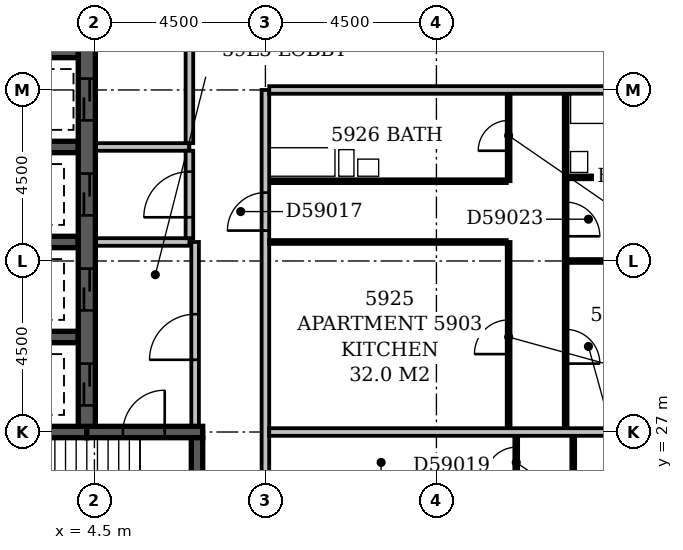
"""IFC4 building model, lengths in metres.
Left out: names, types, materials, properties, quantities, classifications, styles, units other than length and angle.
Written with IfcOpenShell. Run it as: python <this file> out.ifc"""

import sys

from ifc_helpers import new_model, si_unit, direction, frame, frame_2d, origin, place, context, subcontext, project, spatial, rectangle, extrude, element, fill, save


model = new_model("IFC4")
c1 = context("Model", 3, precision=1e-05, world=origin(), true_north=direction((0.0, 1.0)))
c2 = subcontext(c1, "Body", "Model", "MODEL_VIEW")
j1 = project(units=[si_unit("LENGTHUNIT", "METRE"), si_unit("PLANEANGLEUNIT", "RADIAN")], contexts=[c1])
p1 = place(None, origin())
s1 = spatial("IfcSite", under=j1, at=p1, CompositionType="ELEMENT")
p2 = place(p1, origin())
s2 = spatial("IfcBuilding", under=s1, at=p2, CompositionType="ELEMENT")
p3 = place(p2, frame((0.0, 0.0, 229.4)))
s3 = spatial("IfcBuildingStorey", under=s2, at=p3, CompositionType="ELEMENT", Elevation=229.4)
p4 = place(p3, frame((0.35, 27.0, -0.3), z_axis=(0.0, 0.0, 1.0), x_axis=(1.0, 0.0, 0.0)))
e1 = element("IfcWall", 1, at=p4, inside=s3, PredefinedType="SHEAR", context=c2, shape_type="SweptSolid", body=[
    extrude(rectangle(XDim=3.95, YDim=0.3, at=frame_2d((1.975, 0.0))), origin(), (0.0, 0.0, 1.0), 3.55),
])
for number, where, z_axis, x_axis in (
    (2, (0.725, 29.5, -0.3), (0.0, 0.0, 1.0), (1.0, 0.0, 0.0)),
    (3, (0.725, 32.0, -0.3), (0.0, 0.0, 1.0), (1.0, 0.0, 0.0)),
    (4, (0.725, 34.5, -0.3), (0.0, 0.0, 1.0), (1.0, 0.0, 0.0)),
    (5, (0.725, 37.0, -0.3), (0.0, 0.0, 1.0), (1.0, 0.0, 0.0)),
):
    element("IfcWall", number, at=place(p3, frame(where, z_axis=z_axis, x_axis=x_axis)), inside=s3, PredefinedType="SHEAR", context=c2, shape_type="SweptSolid", body=[
        extrude(rectangle(XDim=3.35, YDim=0.3, at=frame_2d((1.675, 0.0))), origin(), (0.0, 0.0, 1.0), 3.55),
    ])
p5 = place(p3, frame((4.3, 27.0, -0.3), z_axis=(0.0, 0.0, 1.0), x_axis=(1.0, 0.0, 0.0)))
e6 = element("IfcWall", 6, at=p5, inside=s3, PredefinedType="SHEAR", context=c2, shape_type="SweptSolid", body=[
    extrude(rectangle(XDim=3.05, YDim=0.3, at=frame_2d((1.525, 0.0))), origin(), (0.0, 0.0, 1.0), 3.55),
])
p6 = place(p5, frame((0.95, 0.0, 0.3)))
e7 = element("IfcOpeningElement", 7, at=p6, cuts=e6, PredefinedType="OPENING", context=c2, shape_type="SweptSolid", body=[
    extrude(rectangle(XDim=1.1, YDim=2.1, at=frame_2d((0.55, 1.05))), frame((0.0, 0.162, 0.0), z_axis=(0.0, -1.0, 0.0), x_axis=(1.0, 0.0, 0.0)), (0.0, 0.0, 1.0), 0.324),
])
p7 = place(p3, frame((4.3, 27.15, -0.3), z_axis=(0.0, 0.0, 1.0), x_axis=(0.0, 1.0, 0.0)))
e8 = element("IfcWall", 8, at=p7, inside=s3, PredefinedType="SHEAR", context=c2, shape_type="SweptSolid", body=[
    extrude(rectangle(XDim=22.125, YDim=0.45, at=frame_2d((11.062, 0.0))), origin(), (0.0, 0.0, 1.0), 3.55),
])
p8 = place(p7, frame((3.05, 0.0, 0.3)))
e9 = element("IfcOpeningElement", 9, at=p8, cuts=e8, PredefinedType="OPENING", context=c2, shape_type="SweptSolid", body=[
    extrude(rectangle(XDim=1.1, YDim=2.1, at=frame_2d((0.55, 1.05))), frame((0.0, 0.237, 0.0), z_axis=(0.0, -1.0, 0.0), x_axis=(1.0, 0.0, 0.0)), (0.0, 0.0, 1.0), 0.474),
])
p9 = place(p7, frame((0.55, 0.0, 0.3)))
e10 = element("IfcOpeningElement", 10, at=p9, cuts=e8, PredefinedType="OPENING", context=c2, shape_type="SweptSolid", body=[
    extrude(rectangle(XDim=1.1, YDim=2.1, at=frame_2d((0.55, 1.05))), frame((0.0, 0.237, 0.0), z_axis=(0.0, -1.0, 0.0), x_axis=(1.0, 0.0, 0.0)), (0.0, 0.0, 1.0), 0.474),
])
p10 = place(p7, frame((20.55, 0.0, 0.3)))
e11 = element("IfcOpeningElement", 11, at=p10, cuts=e8, PredefinedType="OPENING", context=c2, shape_type="SweptSolid", body=[
    extrude(rectangle(XDim=1.1, YDim=2.1, at=frame_2d((0.55, 1.05))), frame((0.0, 0.237, 0.0), z_axis=(0.0, -1.0, 0.0), x_axis=(1.0, 0.0, 0.0)), (0.0, 0.0, 1.0), 0.474),
])
p11 = place(p7, frame((18.05, 0.0, 0.3)))
e12 = element("IfcOpeningElement", 12, at=p11, cuts=e8, PredefinedType="OPENING", context=c2, shape_type="SweptSolid", body=[
    extrude(rectangle(XDim=1.1, YDim=2.1, at=frame_2d((0.55, 1.05))), frame((0.0, 0.237, 0.0), z_axis=(0.0, -1.0, 0.0), x_axis=(1.0, 0.0, 0.0)), (0.0, 0.0, 1.0), 0.474),
])
p12 = place(p7, frame((15.55, 0.0, 0.3)))
e13 = element("IfcOpeningElement", 13, at=p12, cuts=e8, PredefinedType="OPENING", context=c2, shape_type="SweptSolid", body=[
    extrude(rectangle(XDim=1.1, YDim=2.1, at=frame_2d((0.55, 1.05))), frame((0.0, 0.237, 0.0), z_axis=(0.0, -1.0, 0.0), x_axis=(1.0, 0.0, 0.0)), (0.0, 0.0, 1.0), 0.474),
])
p13 = place(p7, frame((13.05, 0.0, 0.3)))
e14 = element("IfcOpeningElement", 14, at=p13, cuts=e8, PredefinedType="OPENING", context=c2, shape_type="SweptSolid", body=[
    extrude(rectangle(XDim=1.1, YDim=2.1, at=frame_2d((0.55, 1.05))), frame((0.0, 0.237, 0.0), z_axis=(0.0, -1.0, 0.0), x_axis=(1.0, 0.0, 0.0)), (0.0, 0.0, 1.0), 0.474),
])
p14 = place(p7, frame((10.55, 0.0, 0.3)))
e15 = element("IfcOpeningElement", 15, at=p14, cuts=e8, PredefinedType="OPENING", context=c2, shape_type="SweptSolid", body=[
    extrude(rectangle(XDim=1.1, YDim=2.1, at=frame_2d((0.55, 1.05))), frame((0.0, 0.237, 0.0), z_axis=(0.0, -1.0, 0.0), x_axis=(1.0, 0.0, 0.0)), (0.0, 0.0, 1.0), 0.474),
])
p15 = place(p7, frame((8.05, 0.0, 0.3)))
e16 = element("IfcOpeningElement", 16, at=p15, cuts=e8, PredefinedType="OPENING", context=c2, shape_type="SweptSolid", body=[
    extrude(rectangle(XDim=1.1, YDim=2.1, at=frame_2d((0.55, 1.05))), frame((0.0, 0.237, 0.0), z_axis=(0.0, -1.0, 0.0), x_axis=(1.0, 0.0, 0.0)), (0.0, 0.0, 1.0), 0.474),
])
p16 = place(p7, frame((5.55, 0.0, 0.3)))
e17 = element("IfcOpeningElement", 17, at=p16, cuts=e8, PredefinedType="OPENING", context=c2, shape_type="SweptSolid", body=[
    extrude(rectangle(XDim=1.1, YDim=2.1, at=frame_2d((0.55, 1.05))), frame((0.0, 0.237, 0.0), z_axis=(0.0, -1.0, 0.0), x_axis=(1.0, 0.0, 0.0)), (0.0, 0.0, 1.0), 0.474),
])
p17 = place(p3, frame((7.2, 22.65, -0.3), z_axis=(0.0, 0.0, 1.0), x_axis=(0.0, 1.0, 0.0)))
e18 = element("IfcWall", 18, at=p17, inside=s3, PredefinedType="SHEAR", context=c2, shape_type="SweptSolid", body=[
    extrude(rectangle(XDim=4.2, YDim=0.3, at=frame_2d((2.1, 0.0))), origin(), (0.0, 0.0, 1.0), 3.55),
])
p18 = place(p17, frame((0.8, 0.0, 0.3)))
e19 = element("IfcOpeningElement", 19, at=p18, cuts=e18, PredefinedType="OPENING", context=c2, shape_type="SweptSolid", body=[
    extrude(rectangle(XDim=1.1, YDim=2.1, at=frame_2d((0.55, 1.05))), frame((0.0, 0.162, 0.0), z_axis=(0.0, -1.0, 0.0), x_axis=(1.0, 0.0, 0.0)), (0.0, 0.0, 1.0), 0.324),
])
p19 = place(p3, frame((4.545, 34.5, 0.0), z_axis=(0.0, 0.0, 1.0), x_axis=(1.0, 0.0, 0.0)))
e20 = element("IfcWall", 20, at=p19, inside=s3, PredefinedType="PARTITIONING", context=c2, shape_type="SweptSolid", body=[
    extrude(rectangle(XDim=2.455, YDim=0.2, at=frame_2d((1.228, 0.0))), origin(), (0.0, 0.0, 1.0), 3.25),
])
p20 = place(p3, frame((7.0, 34.6, 0.0), z_axis=(0.0, 0.0, 1.0), x_axis=(0.0, 1.0, 0.0)))
e21 = element("IfcWall", 21, at=p20, inside=s3, PredefinedType="PARTITIONING", context=c2, shape_type="SweptSolid", body=[
    extrude(rectangle(XDim=14.9, YDim=0.2, at=frame_2d((7.45, 0.0))), origin(), (0.0, 0.0, 1.0), 3.25),
])
p21 = place(p20, frame((2.8, 0.0, 0.0)))
e22 = element("IfcOpeningElement", 22, at=p21, cuts=e21, PredefinedType="OPENING", context=c2, shape_type="SweptSolid", body=[
    extrude(rectangle(XDim=1.2, YDim=2.1, at=frame_2d((0.6, 1.05))), frame((0.0, 0.112, 0.0), z_axis=(0.0, -1.0, 0.0), x_axis=(1.0, 0.0, 0.0)), (0.0, 0.0, 1.0), 0.224),
])
p22 = place(p20, frame((9.8, 0.0, 0.0)))
e23 = element("IfcOpeningElement", 23, at=p22, cuts=e21, PredefinedType="OPENING", context=c2, shape_type="SweptSolid", body=[
    extrude(rectangle(XDim=1.2, YDim=2.1, at=frame_2d((0.6, 1.05))), frame((0.0, 0.112, 0.0), z_axis=(0.0, -1.0, 0.0), x_axis=(1.0, 0.0, 0.0)), (0.0, 0.0, 1.0), 0.224),
])
p23 = place(p3, frame((4.545, 32.0, 0.0), z_axis=(0.0, 0.0, 1.0), x_axis=(1.0, 0.0, 0.0)))
e24 = element("IfcWall", 24, at=p23, inside=s3, PredefinedType="PARTITIONING", context=c2, shape_type="SweptSolid", body=[
    extrude(rectangle(XDim=2.455, YDim=0.2, at=frame_2d((1.228, 0.0))), origin(), (0.0, 0.0, 1.0), 3.25),
])
p24 = place(p3, frame((7.0, 32.1, 0.0), z_axis=(0.0, 0.0, 1.0), x_axis=(0.0, 1.0, 0.0)))
e25 = element("IfcWall", 25, at=p24, inside=s3, PredefinedType="PARTITIONING", context=c2, shape_type="SweptSolid", body=[
    extrude(rectangle(XDim=2.3, YDim=0.2, at=frame_2d((1.15, 0.0))), origin(), (0.0, 0.0, 1.0), 3.25),
])
p25 = place(p24, frame((0.55, 0.0, 0.0)))
e26 = element("IfcOpeningElement", 26, at=p25, cuts=e25, PredefinedType="OPENING", context=c2, shape_type="SweptSolid", body=[
    extrude(rectangle(XDim=1.2, YDim=2.1, at=frame_2d((0.6, 1.05))), frame((0.0, 0.112, 0.0), z_axis=(0.0, -1.0, 0.0), x_axis=(1.0, 0.0, 0.0)), (0.0, 0.0, 1.0), 0.224),
])
p26 = place(p3, frame((7.15, 27.17, 0.0), z_axis=(0.0, 0.0, 1.0), x_axis=(0.0, 1.0, 0.0)))
e27 = element("IfcWall", 27, at=p26, inside=s3, PredefinedType="PARTITIONING", context=c2, shape_type="SweptSolid", body=[
    extrude(rectangle(XDim=4.83, YDim=0.2, at=frame_2d((2.415, 0.0))), origin(), (0.0, 0.0, 1.0), 3.25),
])
p27 = place(p26, frame((1.73, 0.0, 0.0)))
e28 = element("IfcOpeningElement", 28, at=p27, cuts=e27, PredefinedType="OPENING", context=c2, shape_type="SweptSolid", body=[
    extrude(rectangle(XDim=1.2, YDim=2.1, at=frame_2d((0.6, 1.05))), frame((0.0, 0.112, 0.0), z_axis=(0.0, -1.0, 0.0), x_axis=(1.0, 0.0, 0.0)), (0.0, 0.0, 1.0), 0.224),
])
p28 = place(p3, frame((17.1, 17.4, 0.0), z_axis=(0.0, 0.0, 1.0), x_axis=(0.0, 1.0, 0.0)))
e29 = element("IfcWall", 29, at=p28, inside=s3, PredefinedType="PARTITIONING", context=c2, shape_type="SweptSolid", body=[
    extrude(rectangle(XDim=9.5, YDim=0.1, at=frame_2d((4.75, 0.0))), origin(), (0.0, 0.0, 1.0), 3.25),
])
p29 = place(p28, frame((2.4, 0.0, 0.0)))
e30 = element("IfcOpeningElement", 30, at=p29, cuts=e29, PredefinedType="OPENING", context=c2, shape_type="SweptSolid", body=[
    extrude(rectangle(XDim=0.9, YDim=2.1, at=frame_2d((0.45, 1.05))), frame((0.0, 0.062, 0.0), z_axis=(0.0, -1.0, 0.0), x_axis=(1.0, 0.0, 0.0)), (0.0, 0.0, 1.0), 0.124),
])
p30 = place(p28, frame((6.9, 0.0, 0.0)))
e31 = element("IfcOpeningElement", 31, at=p30, cuts=e29, PredefinedType="OPENING", context=c2, shape_type="SweptSolid", body=[
    extrude(rectangle(XDim=0.9, YDim=2.1, at=frame_2d((0.45, 1.05))), frame((0.0, 0.062, 0.0), z_axis=(0.0, -1.0, 0.0), x_axis=(1.0, 0.0, 0.0)), (0.0, 0.0, 1.0), 0.124),
])
p31 = place(p3, frame((9.0, 18.45, 0.0), z_axis=(0.0, 0.0, 1.0), x_axis=(0.0, 1.0, 0.0)))
e32 = element("IfcWall", 32, at=p31, inside=s3, PredefinedType="PARTITIONING", context=c2, shape_type="SweptSolid", body=[
    extrude(rectangle(XDim=17.55, YDim=0.2, at=frame_2d((8.775, 0.0))), origin(), (0.0, 0.0, 1.0), 3.25),
])
p32 = place(p31, frame((13.85, 0.0, 0.0)))
e33 = element("IfcOpeningElement", 33, at=p32, cuts=e32, PredefinedType="OPENING", context=c2, shape_type="SweptSolid", body=[
    extrude(rectangle(XDim=1.0, YDim=2.1, at=frame_2d((0.5, 1.05))), frame((0.0, 0.112, 0.0), z_axis=(0.0, -1.0, 0.0), x_axis=(1.0, 0.0, 0.0)), (0.0, 0.0, 1.0), 0.224),
])
p33 = place(p31, frame((3.25, 0.0, 0.0)))
e34 = element("IfcOpeningElement", 34, at=p33, cuts=e32, PredefinedType="OPENING", context=c2, shape_type="SweptSolid", body=[
    extrude(rectangle(XDim=1.0, YDim=2.1, at=frame_2d((0.5, 1.05))), frame((0.0, 0.112, 0.0), z_axis=(0.0, -1.0, 0.0), x_axis=(1.0, 0.0, 0.0)), (0.0, 0.0, 1.0), 0.224),
])
p34 = place(p3, frame((15.6, 23.0, 0.0), z_axis=(0.0, 0.0, 1.0), x_axis=(0.0, 1.0, 0.0)))
e35 = element("IfcWall", 35, at=p34, inside=s3, PredefinedType="PARTITIONING", context=c2, shape_type="SweptSolid", body=[
    extrude(rectangle(XDim=3.9, YDim=0.1, at=frame_2d((1.95, 0.0))), origin(), (0.0, 0.0, 1.0), 3.25),
])
p35 = place(p34, frame((0.8, 0.0, 0.0)))
e36 = element("IfcOpeningElement", 36, at=p35, cuts=e35, PredefinedType="OPENING", context=c2, shape_type="SweptSolid", body=[
    extrude(rectangle(XDim=0.8, YDim=2.1, at=frame_2d((0.4, 1.05))), frame((0.0, 0.062, 0.0), z_axis=(0.0, -1.0, 0.0), x_axis=(1.0, 0.0, 0.0)), (0.0, 0.0, 1.0), 0.124),
])
p36 = place(p34, frame((2.8, 0.0, 0.0)))
e37 = element("IfcOpeningElement", 37, at=p36, cuts=e35, PredefinedType="OPENING", context=c2, shape_type="SweptSolid", body=[
    extrude(rectangle(XDim=0.8, YDim=2.1, at=frame_2d((0.4, 1.05))), frame((0.0, 0.062, 0.0), z_axis=(0.0, -1.0, 0.0), x_axis=(1.0, 0.0, 0.0)), (0.0, 0.0, 1.0), 0.124),
])
p37 = place(p3, frame((9.1, 27.0, 0.0), z_axis=(0.0, 0.0, 1.0), x_axis=(1.0, 0.0, 0.0)))
e38 = element("IfcWall", 38, at=p37, inside=s3, PredefinedType="PARTITIONING", context=c2, shape_type="SweptSolid", body=[
    extrude(rectangle(XDim=12.95, YDim=0.2, at=frame_2d((6.475, 0.0))), origin(), (0.0, 0.0, 1.0), 2.65),
])
p38 = place(p3, frame((15.4, 27.1, 0.0), z_axis=(0.0, 0.0, 1.0), x_axis=(0.0, 1.0, 0.0)))
e39 = element("IfcWall", 39, at=p38, inside=s3, PredefinedType="PARTITIONING", context=c2, shape_type="SweptSolid", body=[
    extrude(rectangle(XDim=4.9, YDim=0.1, at=frame_2d((2.45, 0.0))), origin(), (0.0, 0.0, 1.0), 3.25),
])
p39 = place(p38, frame((1.95, 0.0, 0.0)))
e40 = element("IfcOpeningElement", 40, at=p39, cuts=e39, PredefinedType="OPENING", context=c2, shape_type="SweptSolid", body=[
    extrude(rectangle(XDim=0.9, YDim=2.1, at=frame_2d((0.45, 1.05))), frame((0.0, 0.062, 0.0), z_axis=(0.0, -1.0, 0.0), x_axis=(1.0, 0.0, 0.0)), (0.0, 0.0, 1.0), 0.124),
])
p40 = place(p3, frame((16.9, 27.1, 0.0), z_axis=(0.0, 0.0, 1.0), x_axis=(0.0, 1.0, 0.0)))
e41 = element("IfcWall", 41, at=p40, inside=s3, PredefinedType="PARTITIONING", context=c2, shape_type="SweptSolid", body=[
    extrude(rectangle(XDim=8.8, YDim=0.1, at=frame_2d((4.4, 0.0))), origin(), (0.0, 0.0, 1.0), 3.25),
])
p41 = place(p40, frame((1.7, 0.0, 0.0)))
e42 = element("IfcOpeningElement", 42, at=p41, cuts=e41, PredefinedType="OPENING", context=c2, shape_type="SweptSolid", body=[
    extrude(rectangle(XDim=0.9, YDim=2.1, at=frame_2d((0.45, 1.05))), frame((0.0, 0.062, 0.0), z_axis=(0.0, -1.0, 0.0), x_axis=(1.0, 0.0, 0.0)), (0.0, 0.0, 1.0), 0.124),
])
p42 = place(p40, frame((5.05, 0.0, 0.0)))
e43 = element("IfcOpeningElement", 43, at=p42, cuts=e41, PredefinedType="OPENING", context=c2, shape_type="SweptSolid", body=[
    extrude(rectangle(XDim=0.9, YDim=2.1, at=frame_2d((0.45, 1.05))), frame((0.0, 0.062, 0.0), z_axis=(0.0, -1.0, 0.0), x_axis=(1.0, 0.0, 0.0)), (0.0, 0.0, 1.0), 0.124),
])
p43 = place(p3, frame((16.95, 31.5, 0.0), z_axis=(0.0, 0.0, 1.0), x_axis=(1.0, 0.0, 0.0)))
e44 = element("IfcWall", 44, at=p43, inside=s3, PredefinedType="PARTITIONING", context=c2, shape_type="SweptSolid", body=[
    extrude(rectangle(XDim=5.1, YDim=0.1, at=frame_2d((2.55, 0.0))), origin(), (0.0, 0.0, 1.0), 3.25),
])
p44 = place(p3, frame((9.1, 32.0, 0.0), z_axis=(0.0, 0.0, 1.0), x_axis=(1.0, 0.0, 0.0)))
e45 = element("IfcWall", 45, at=p44, inside=s3, PredefinedType="PARTITIONING", context=c2, shape_type="SweptSolid", body=[
    extrude(rectangle(XDim=6.25, YDim=0.1, at=frame_2d((3.125, 0.0))), origin(), (0.0, 0.0, 1.0), 3.25),
])
p45 = place(p3, frame((9.1, 33.6, 0.0), z_axis=(0.0, 0.0, 1.0), x_axis=(1.0, 0.0, 0.0)))
e46 = element("IfcWall", 46, at=p45, inside=s3, PredefinedType="PLUMBINGWALL", context=c2, shape_type="SweptSolid", body=[
    extrude(rectangle(XDim=6.25, YDim=0.1, at=frame_2d((3.125, 0.0))), origin(), (0.0, 0.0, 1.0), 3.25),
])
p46 = place(p3, frame((15.4, 33.6, 0.0), z_axis=(0.0, 0.0, 1.0), x_axis=(0.0, 1.0, 0.0)))
e47 = element("IfcWall", 47, at=p46, inside=s3, PredefinedType="PARTITIONING", context=c2, shape_type="SweptSolid", body=[
    extrude(rectangle(XDim=2.3, YDim=0.1, at=frame_2d((1.15, 0.0))), origin(), (0.0, 0.0, 1.0), 3.25),
])
p47 = place(p46, frame((0.8, 0.0, 0.0)))
e48 = element("IfcOpeningElement", 48, at=p47, cuts=e47, PredefinedType="OPENING", context=c2, shape_type="SweptSolid", body=[
    extrude(rectangle(XDim=0.8, YDim=2.1, at=frame_2d((0.4, 1.05))), frame((0.0, 0.062, 0.0), z_axis=(0.0, -1.0, 0.0), x_axis=(1.0, 0.0, 0.0)), (0.0, 0.0, 1.0), 0.124),
])
p48 = place(p3, frame((16.95, 33.7, 0.0), z_axis=(0.0, 0.0, 1.0), x_axis=(1.0, 0.0, 0.0)))
e49 = element("IfcWall", 49, at=p48, inside=s3, PredefinedType="PLUMBINGWALL", context=c2, shape_type="SweptSolid", body=[
    extrude(rectangle(XDim=2.8, YDim=0.1, at=frame_2d((1.4, 0.0))), origin(), (0.0, 0.0, 1.0), 3.25),
])
p49 = place(p48, frame((1.0, 0.0, 0.0)))
e50 = element("IfcOpeningElement", 50, at=p49, cuts=e49, PredefinedType="OPENING", context=c2, shape_type="SweptSolid", body=[
    extrude(rectangle(XDim=0.8, YDim=2.1, at=frame_2d((0.4, 1.05))), frame((0.0, 0.062, 0.0), z_axis=(0.0, -1.0, 0.0), x_axis=(1.0, 0.0, 0.0)), (0.0, 0.0, 1.0), 0.124),
])
p50 = place(p3, frame((9.1, 36.0, 0.0), z_axis=(0.0, 0.0, 1.0), x_axis=(1.0, 0.0, 0.0)))
e51 = element("IfcWall", 51, at=p50, inside=s3, PredefinedType="PARTITIONING", context=c2, shape_type="SweptSolid", body=[
    extrude(rectangle(XDim=12.95, YDim=0.2, at=frame_2d((6.475, 0.0))), origin(), (0.0, 0.0, 1.0), 3.25),
])
p51 = place(p27, origin())
e52 = element("IfcDoor", 52, at=p51, inside=s3, OperationType="SINGLE_SWING_LEFT", PredefinedType="DOOR", context=c2, shape_type="SweptSolid", body=[
    extrude(rectangle(XDim=1.2, YDim=2.1, at=frame_2d((0.6, 1.05))), frame((0.0, 0.025, 0.0), z_axis=(0.0, -1.0, 0.0), x_axis=(1.0, 0.0, 0.0)), (0.0, 0.0, 1.0), 0.05),
])
fill(e28, e52)
p52 = place(p8, origin())
e53 = element("IfcDoor", 53, at=p52, inside=s3, OperationType="SLIDING_TO_LEFT", PredefinedType="DOOR", context=c2, shape_type="SweptSolid", body=[
    extrude(rectangle(XDim=1.1, YDim=2.1, at=frame_2d((0.55, 1.05))), frame((0.0, 0.025, 0.0), z_axis=(0.0, -1.0, 0.0), x_axis=(1.0, 0.0, 0.0)), (0.0, 0.0, 1.0), 0.05),
])
fill(e9, e53)
p53 = place(p9, origin())
e54 = element("IfcDoor", 54, at=p53, inside=s3, OperationType="SLIDING_TO_LEFT", PredefinedType="DOOR", context=c2, shape_type="SweptSolid", body=[
    extrude(rectangle(XDim=1.1, YDim=2.1, at=frame_2d((0.55, 1.05))), frame((0.0, 0.025, 0.0), z_axis=(0.0, -1.0, 0.0), x_axis=(1.0, 0.0, 0.0)), (0.0, 0.0, 1.0), 0.05),
])
fill(e10, e54)
p54 = place(p15, origin())
e55 = element("IfcDoor", 55, at=p54, inside=s3, OperationType="SLIDING_TO_LEFT", PredefinedType="DOOR", context=c2, shape_type="SweptSolid", body=[
    extrude(rectangle(XDim=1.1, YDim=2.1, at=frame_2d((0.55, 1.05))), frame((0.0, 0.025, 0.0), z_axis=(0.0, -1.0, 0.0), x_axis=(1.0, 0.0, 0.0)), (0.0, 0.0, 1.0), 0.05),
])
fill(e16, e55)
p55 = place(p25, origin())
e56 = element("IfcDoor", 56, at=p55, inside=s3, OperationType="SINGLE_SWING_LEFT", PredefinedType="DOOR", context=c2, shape_type="SweptSolid", body=[
    extrude(rectangle(XDim=1.2, YDim=2.1, at=frame_2d((0.6, 1.05))), frame((0.0, 0.025, 0.0), z_axis=(0.0, -1.0, 0.0), x_axis=(1.0, 0.0, 0.0)), (0.0, 0.0, 1.0), 0.05),
])
fill(e26, e56)
p56 = place(p16, origin())
e57 = element("IfcDoor", 57, at=p56, inside=s3, OperationType="SLIDING_TO_LEFT", PredefinedType="DOOR", context=c2, shape_type="SweptSolid", body=[
    extrude(rectangle(XDim=1.1, YDim=2.1, at=frame_2d((0.55, 1.05))), frame((0.0, 0.025, 0.0), z_axis=(0.0, -1.0, 0.0), x_axis=(1.0, 0.0, 0.0)), (0.0, 0.0, 1.0), 0.05),
])
fill(e17, e57)
p57 = place(p6, frame((1.1, 0.0, 0.0), z_axis=(0.0, 0.0, 1.0), x_axis=(-1.0, 0.0, 0.0)))
e58 = element("IfcDoor", 58, at=p57, inside=s3, OperationType="SINGLE_SWING_LEFT", PredefinedType="DOOR", context=c2, shape_type="SweptSolid", body=[
    extrude(rectangle(XDim=1.1, YDim=2.1, at=frame_2d((0.55, 1.05))), frame((0.0, 0.025, 0.0), z_axis=(0.0, -1.0, 0.0), x_axis=(1.0, 0.0, 0.0)), (0.0, 0.0, 1.0), 0.05),
])
fill(e7, e58)
p58 = place(p32, origin())
e59 = element("IfcDoor", 59, at=p58, inside=s3, OperationType="SINGLE_SWING_LEFT", PredefinedType="DOOR", context=c2, shape_type="SweptSolid", body=[
    extrude(rectangle(XDim=1.0, YDim=2.1, at=frame_2d((0.5, 1.05))), frame((0.0, 0.025, 0.0), z_axis=(0.0, -1.0, 0.0), x_axis=(1.0, 0.0, 0.0)), (0.0, 0.0, 1.0), 0.05),
])
fill(e33, e59)
p59 = place(p36, origin())
e60 = element("IfcDoor", 60, at=p59, inside=s3, OperationType="SINGLE_SWING_LEFT", PredefinedType="DOOR", context=c2, shape_type="SweptSolid", body=[
    extrude(rectangle(XDim=0.8, YDim=2.1, at=frame_2d((0.4, 1.05))), frame((0.0, 0.025, 0.0), z_axis=(0.0, -1.0, 0.0), x_axis=(1.0, 0.0, 0.0)), (0.0, 0.0, 1.0), 0.05),
])
fill(e37, e60)
p60 = place(p39, origin())
e61 = element("IfcDoor", 61, at=p60, inside=s3, OperationType="SINGLE_SWING_LEFT", PredefinedType="DOOR", context=c2, shape_type="SweptSolid", body=[
    extrude(rectangle(XDim=0.9, YDim=2.1, at=frame_2d((0.45, 1.05))), frame((0.0, 0.025, 0.0), z_axis=(0.0, -1.0, 0.0), x_axis=(1.0, 0.0, 0.0)), (0.0, 0.0, 1.0), 0.05),
])
fill(e40, e61)
p61 = place(p41, frame((0.9, 0.0, 0.0), z_axis=(0.0, 0.0, 1.0), x_axis=(-1.0, 0.0, 0.0)))
e62 = element("IfcDoor", 62, at=p61, inside=s3, OperationType="SINGLE_SWING_RIGHT", PredefinedType="DOOR", context=c2, shape_type="SweptSolid", body=[
    extrude(rectangle(XDim=0.9, YDim=2.1, at=frame_2d((0.45, 1.05))), frame((0.0, 0.025, 0.0), z_axis=(0.0, -1.0, 0.0), x_axis=(1.0, 0.0, 0.0)), (0.0, 0.0, 1.0), 0.05),
])
fill(e42, e62)
p62 = place(p42, frame((0.9, 0.0, 0.0), z_axis=(0.0, 0.0, 1.0), x_axis=(-1.0, 0.0, 0.0)))
e63 = element("IfcDoor", 63, at=p62, inside=s3, OperationType="SINGLE_SWING_RIGHT", PredefinedType="DOOR", context=c2, shape_type="SweptSolid", body=[
    extrude(rectangle(XDim=0.9, YDim=2.1, at=frame_2d((0.45, 1.05))), frame((0.0, 0.025, 0.0), z_axis=(0.0, -1.0, 0.0), x_axis=(1.0, 0.0, 0.0)), (0.0, 0.0, 1.0), 0.05),
])
fill(e43, e63)
p63 = place(p47, origin())
e64 = element("IfcDoor", 64, at=p63, inside=s3, OperationType="SINGLE_SWING_LEFT", PredefinedType="DOOR", context=c2, shape_type="SweptSolid", body=[
    extrude(rectangle(XDim=0.8, YDim=2.1, at=frame_2d((0.4, 1.05))), frame((0.0, 0.025, 0.0), z_axis=(0.0, -1.0, 0.0), x_axis=(1.0, 0.0, 0.0)), (0.0, 0.0, 1.0), 0.05),
])
fill(e48, e64)
save(model, sys.argv[1])
